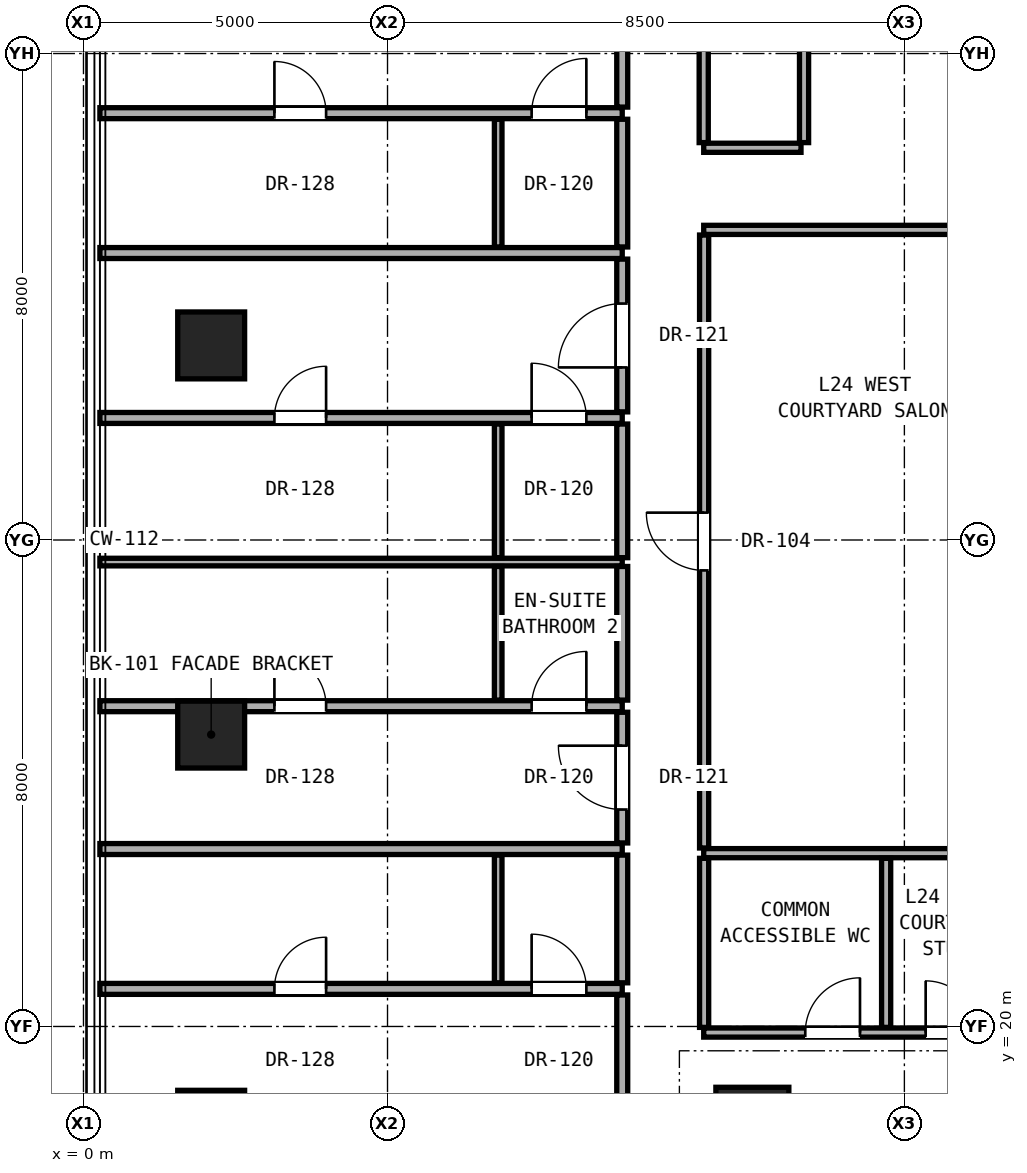
"""IFC4 building model, lengths in metres.
Left out: names, types, materials, properties, quantities, classifications, styles, units other than length and angle.
Written with IfcOpenShell. Run it as: python <this file> out.ifc"""

import sys

from ifc_helpers import new_model, si_unit, direction, frame, frame_2d, origin, origin_2d, place, context, subcontext, project, spatial, rectangle, hollow_rectangle, extrude, element, fill, save


model = new_model("IFC4")
c1 = context("Model", 3, precision=1e-05, world=origin(), true_north=direction((0.0, 1.0)))
c2 = subcontext(c1, "Body", "Model", "MODEL_VIEW")
j1 = project(units=[si_unit("LENGTHUNIT", "METRE"), si_unit("PLANEANGLEUNIT", "RADIAN")], contexts=[c1])
p1 = place(None, origin())
s1 = spatial("IfcSite", under=j1, at=p1, CompositionType="ELEMENT")
p2 = place(p1, origin())
s2 = spatial("IfcBuilding", under=s1, at=p2, CompositionType="ELEMENT")
p3 = place(p2, frame((0.0, 0.0, 88.4)))
s3 = spatial("IfcBuildingStorey", under=s2, at=p3, CompositionType="ELEMENT", Elevation=88.4)
p4 = place(p3, frame((11.0, 18.4, 0.0), z_axis=(0.0, 0.0, 1.0), x_axis=(1.0, 0.0, 0.0)))
e1 = element("IfcColumn", 1, at=p4, inside=s3, PredefinedType="COLUMN", context=c2, shape_type="SweptSolid", body=[
    extrude(rectangle(XDim=1.2, YDim=1.2, at=origin_2d()), origin(), (0.0, 0.0, 1.0), 3.3),
])
for number, where, z_axis, x_axis in (
    (2, (2.1, 18.4, 0.0), (0.0, 0.0, 1.0), (1.0, 0.0, 0.0)),
    (3, (2.1, 24.8, 0.0), (0.0, 0.0, 1.0), (1.0, 0.0, 0.0)),
    (4, (2.1, 31.2, 0.0), (0.0, 0.0, 1.0), (1.0, 0.0, 0.0)),
):
    element("IfcColumn", number, at=place(p3, frame(where, z_axis=z_axis, x_axis=x_axis)), inside=s3, PredefinedType="COLUMN", context=c2, shape_type="SweptSolid", body=[
        extrude(hollow_rectangle(XDim=1.1, YDim=1.1, WallThickness=0.06, at=origin_2d()), origin(), (0.0, 0.0, 1.0), 3.3),
    ])
p5 = place(p3, frame((10.2, 19.9, 0.0), z_axis=(0.0, 0.0, 1.0), x_axis=(1.0, 0.0, 0.0)))
e5 = element("IfcWall", 5, at=p5, inside=s3, PredefinedType="PARTITIONING", context=c2, shape_type="SweptSolid", body=[
    extrude(rectangle(XDim=20.6, YDim=0.15, at=frame_2d((10.3, 0.0))), origin(), (0.0, 0.0, 1.0), 2.124),
])
p6 = place(p5, frame((1.67, 0.0, 0.0)))
e6 = element("IfcOpeningElement", 6, at=p6, cuts=e5, PredefinedType="OPENING", context=c2, shape_type="SweptSolid", body=[
    extrude(rectangle(XDim=0.9, YDim=2.1, at=frame_2d((0.45, 1.05))), frame((0.0, 0.085, 0.0), z_axis=(0.0, -1.0, 0.0), x_axis=(1.0, 0.0, 0.0)), (0.0, 0.0, 1.0), 0.17),
])
p7 = place(p5, frame((3.65, 0.0, 0.0)))
e7 = element("IfcOpeningElement", 7, at=p7, cuts=e5, PredefinedType="OPENING", context=c2, shape_type="SweptSolid", body=[
    extrude(rectangle(XDim=0.85, YDim=2.01, at=frame_2d((0.425, 1.005))), frame((0.0, 0.085, 0.0), z_axis=(0.0, -1.0, 0.0), x_axis=(1.0, 0.0, 0.0)), (0.0, 0.0, 1.0), 0.17),
])
p8 = place(p5, frame((7.197, 0.0, 0.0)))
e8 = element("IfcOpeningElement", 8, at=p8, cuts=e5, PredefinedType="OPENING", context=c2, shape_type="SweptSolid", body=[
    extrude(rectangle(XDim=0.85, YDim=2.01, at=frame_2d((0.425, 1.005))), frame((0.0, 0.085, 0.0), z_axis=(0.0, -1.0, 0.0), x_axis=(1.0, 0.0, 0.0)), (0.0, 0.0, 1.0), 0.17),
])
p9 = place(p3, frame((0.27, 20.618, 0.0), z_axis=(0.0, 0.0, 1.0), x_axis=(1.0, 0.0, 0.0)))
e9 = element("IfcWall", 9, at=p9, inside=s3, PredefinedType="PARTITIONING", context=c2, shape_type="SweptSolid", body=[
    extrude(rectangle(XDim=8.59, YDim=0.18, at=frame_2d((4.295, 0.0))), origin(), (0.0, 0.0, 1.0), 2.145),
])
p10 = place(p9, frame((2.87, 0.0, 0.0)))
e10 = element("IfcOpeningElement", 10, at=p10, cuts=e9, PredefinedType="OPENING", context=c2, shape_type="SweptSolid", body=[
    extrude(rectangle(XDim=0.85, YDim=2.01, at=frame_2d((0.425, 1.005))), frame((0.0, 0.1, 0.0), z_axis=(0.0, -1.0, 0.0), x_axis=(1.0, 0.0, 0.0)), (0.0, 0.0, 1.0), 0.2),
])
p11 = place(p9, frame((7.1, 0.0, 0.0)))
e11 = element("IfcOpeningElement", 11, at=p11, cuts=e9, PredefinedType="OPENING", context=c2, shape_type="SweptSolid", body=[
    extrude(rectangle(XDim=0.9, YDim=2.1, at=frame_2d((0.45, 1.05))), frame((0.0, 0.1, 0.0), z_axis=(0.0, -1.0, 0.0), x_axis=(1.0, 0.0, 0.0)), (0.0, 0.0, 1.0), 0.2),
])
p12 = place(p3, frame((0.27, 22.918, 0.0), z_axis=(0.0, 0.0, 1.0), x_axis=(1.0, 0.0, 0.0)))
e12 = element("IfcWall", 12, at=p12, inside=s3, PredefinedType="PARTITIONING", context=c2, shape_type="SweptSolid", body=[
    extrude(rectangle(XDim=8.59, YDim=0.18, at=frame_2d((4.295, 0.0))), origin(), (0.0, 0.0, 1.0), 2.145),
])
p13 = place(p3, frame((10.2, 22.85, 0.0), z_axis=(0.0, 0.0, 1.0), x_axis=(1.0, 0.0, 0.0)))
e13 = element("IfcWall", 13, at=p13, inside=s3, PredefinedType="PARTITIONING", context=c2, shape_type="SweptSolid", body=[
    extrude(rectangle(XDim=5.15, YDim=0.15, at=frame_2d((2.575, 0.0))), origin(), (0.0, 0.0, 1.0), 2.124),
])
p14 = place(p3, frame((0.27, 25.267, 0.0), z_axis=(0.0, 0.0, 1.0), x_axis=(1.0, 0.0, 0.0)))
e14 = element("IfcWall", 14, at=p14, inside=s3, PredefinedType="PARTITIONING", context=c2, shape_type="SweptSolid", body=[
    extrude(rectangle(XDim=8.59, YDim=0.18, at=frame_2d((4.295, 0.0))), origin(), (0.0, 0.0, 1.0), 2.145),
])
p15 = place(p14, frame((2.87, 0.0, 0.0)))
e15 = element("IfcOpeningElement", 15, at=p15, cuts=e14, PredefinedType="OPENING", context=c2, shape_type="SweptSolid", body=[
    extrude(rectangle(XDim=0.85, YDim=2.01, at=frame_2d((0.425, 1.005))), frame((0.0, 0.1, 0.0), z_axis=(0.0, -1.0, 0.0), x_axis=(1.0, 0.0, 0.0)), (0.0, 0.0, 1.0), 0.2),
])
p16 = place(p14, frame((7.1, 0.0, 0.0)))
e16 = element("IfcOpeningElement", 16, at=p16, cuts=e14, PredefinedType="OPENING", context=c2, shape_type="SweptSolid", body=[
    extrude(rectangle(XDim=0.9, YDim=2.1, at=frame_2d((0.45, 1.05))), frame((0.0, 0.1, 0.0), z_axis=(0.0, -1.0, 0.0), x_axis=(1.0, 0.0, 0.0)), (0.0, 0.0, 1.0), 0.2),
])
p17 = place(p3, frame((0.27, 27.637, 0.0), z_axis=(0.0, 0.0, 1.0), x_axis=(1.0, 0.0, 0.0)))
e17 = element("IfcWall", 17, at=p17, inside=s3, PredefinedType="PARTITIONING", context=c2, shape_type="SweptSolid", body=[
    extrude(rectangle(XDim=8.59, YDim=0.125, at=frame_2d((4.295, 0.0))), origin(), (0.0, 0.0, 1.0), 2.145),
])
p18 = place(p3, frame((0.27, 30.007, 0.0), z_axis=(0.0, 0.0, 1.0), x_axis=(1.0, 0.0, 0.0)))
e18 = element("IfcWall", 18, at=p18, inside=s3, PredefinedType="PARTITIONING", context=c2, shape_type="SweptSolid", body=[
    extrude(rectangle(XDim=8.59, YDim=0.18, at=frame_2d((4.295, 0.0))), origin(), (0.0, 0.0, 1.0), 2.145),
])
p19 = place(p18, frame((2.87, 0.0, 0.0)))
e19 = element("IfcOpeningElement", 19, at=p19, cuts=e18, PredefinedType="OPENING", context=c2, shape_type="SweptSolid", body=[
    extrude(rectangle(XDim=0.85, YDim=2.01, at=frame_2d((0.425, 1.005))), frame((0.0, 0.1, 0.0), z_axis=(0.0, -1.0, 0.0), x_axis=(1.0, 0.0, 0.0)), (0.0, 0.0, 1.0), 0.2),
])
p20 = place(p18, frame((7.1, 0.0, 0.0)))
e20 = element("IfcOpeningElement", 20, at=p20, cuts=e18, PredefinedType="OPENING", context=c2, shape_type="SweptSolid", body=[
    extrude(rectangle(XDim=0.9, YDim=2.1, at=frame_2d((0.45, 1.05))), frame((0.0, 0.1, 0.0), z_axis=(0.0, -1.0, 0.0), x_axis=(1.0, 0.0, 0.0)), (0.0, 0.0, 1.0), 0.2),
])
p21 = place(p3, frame((0.27, 32.719, 0.0), z_axis=(0.0, 0.0, 1.0), x_axis=(1.0, 0.0, 0.0)))
e21 = element("IfcWall", 21, at=p21, inside=s3, PredefinedType="PARTITIONING", context=c2, shape_type="SweptSolid", body=[
    extrude(rectangle(XDim=8.59, YDim=0.18, at=frame_2d((4.295, 0.0))), origin(), (0.0, 0.0, 1.0), 2.145),
])
p22 = place(p3, frame((10.2, 33.1, 0.0), z_axis=(0.0, 0.0, 1.0), x_axis=(1.0, 0.0, 0.0)))
e22 = element("IfcWall", 22, at=p22, inside=s3, PredefinedType="PARTITIONING", context=c2, shape_type="SweptSolid", body=[
    extrude(rectangle(XDim=20.6, YDim=0.15, at=frame_2d((10.3, 0.0))), origin(), (0.0, 0.0, 1.0), 2.124),
])
p23 = place(p22, frame((12.373, 0.0, 0.0)))
e23 = element("IfcOpeningElement", 23, at=p23, cuts=e22, PredefinedType="OPENING", context=c2, shape_type="SweptSolid", body=[
    extrude(rectangle(XDim=0.85, YDim=2.01, at=frame_2d((0.425, 1.005))), frame((0.0, 0.085, 0.0), z_axis=(0.0, -1.0, 0.0), x_axis=(1.0, 0.0, 0.0)), (0.0, 0.0, 1.0), 0.17),
])
p24 = place(p22, frame((17.606, 0.0, 0.0)))
e24 = element("IfcOpeningElement", 24, at=p24, cuts=e22, PredefinedType="OPENING", context=c2, shape_type="SweptSolid", body=[
    extrude(rectangle(XDim=0.85, YDim=2.01, at=frame_2d((0.425, 1.005))), frame((0.0, 0.085, 0.0), z_axis=(0.0, -1.0, 0.0), x_axis=(1.0, 0.0, 0.0)), (0.0, 0.0, 1.0), 0.17),
])
p25 = place(p3, frame((10.2, 34.45, 0.0), z_axis=(0.0, 0.0, 1.0), x_axis=(1.0, 0.0, 0.0)))
e25 = element("IfcWall", 25, at=p25, inside=s3, PredefinedType="PARTITIONING", context=c2, shape_type="SweptSolid", body=[
    extrude(rectangle(XDim=1.6, YDim=0.15, at=frame_2d((0.8, 0.0))), origin(), (0.0, 0.0, 1.0), 2.124),
])
p26 = place(p3, frame((0.27, 35.019, 0.0), z_axis=(0.0, 0.0, 1.0), x_axis=(1.0, 0.0, 0.0)))
e26 = element("IfcWall", 26, at=p26, inside=s3, PredefinedType="PARTITIONING", context=c2, shape_type="SweptSolid", body=[
    extrude(rectangle(XDim=8.59, YDim=0.18, at=frame_2d((4.295, 0.0))), origin(), (0.0, 0.0, 1.0), 2.145),
])
p27 = place(p26, frame((2.87, 0.0, 0.0)))
e27 = element("IfcOpeningElement", 27, at=p27, cuts=e26, PredefinedType="OPENING", context=c2, shape_type="SweptSolid", body=[
    extrude(rectangle(XDim=0.85, YDim=2.01, at=frame_2d((0.425, 1.005))), frame((0.0, 0.1, 0.0), z_axis=(0.0, -1.0, 0.0), x_axis=(1.0, 0.0, 0.0)), (0.0, 0.0, 1.0), 0.2),
])
p28 = place(p26, frame((7.1, 0.0, 0.0)))
e28 = element("IfcOpeningElement", 28, at=p28, cuts=e26, PredefinedType="OPENING", context=c2, shape_type="SweptSolid", body=[
    extrude(rectangle(XDim=0.9, YDim=2.1, at=frame_2d((0.45, 1.05))), frame((0.0, 0.1, 0.0), z_axis=(0.0, -1.0, 0.0), x_axis=(1.0, 0.0, 0.0)), (0.0, 0.0, 1.0), 0.2),
])
p29 = place(p3, frame((6.82, 20.718, 0.0), z_axis=(0.0, 0.0, 1.0), x_axis=(0.0, 1.0, 0.0)))
e29 = element("IfcWall", 29, at=p29, inside=s3, PredefinedType="PARTITIONING", context=c2, shape_type="SweptSolid", body=[
    extrude(rectangle(XDim=2.1, YDim=0.125, at=frame_2d((1.05, 0.0))), origin(), (0.0, 0.0, 1.0), 3.08),
])
for number, where, z_axis, x_axis in (
    (30, (6.82, 25.367, 0.0), (0.0, 0.0, 1.0), (0.0, 1.0, 0.0)),
    (31, (6.82, 27.709, 0.0), (0.0, 0.0, 1.0), (0.0, 1.0, 0.0)),
):
    element("IfcWall", number, at=place(p3, frame(where, z_axis=z_axis, x_axis=x_axis)), inside=s3, PredefinedType="PARTITIONING", context=c2, shape_type="SweptSolid", body=[
        extrude(rectangle(XDim=2.198, YDim=0.125, at=frame_2d((1.099, 0.0))), origin(), (0.0, 0.0, 1.0), 3.08),
    ])
p30 = place(p3, frame((6.82, 32.819, 0.0), z_axis=(0.0, 0.0, 1.0), x_axis=(0.0, 1.0, 0.0)))
e32 = element("IfcWall", 32, at=p30, inside=s3, PredefinedType="PARTITIONING", context=c2, shape_type="SweptSolid", body=[
    extrude(rectangle(XDim=2.1, YDim=0.125, at=frame_2d((1.05, 0.0))), origin(), (0.0, 0.0, 1.0), 3.08),
])
p31 = place(p3, frame((8.86, 14.875, 0.0), z_axis=(0.0, 0.0, 1.0), x_axis=(0.0, 1.0, 0.0)))
e33 = element("IfcWall", 33, at=p31, inside=s3, PredefinedType="PARTITIONING", context=c2, shape_type="SweptSolid", body=[
    extrude(rectangle(XDim=5.643, YDim=0.18, at=frame_2d((2.822, 0.0))), origin(), (0.0, 0.0, 1.0), 2.456),
])
p32 = place(p31, frame((2.296, 0.0, 0.0)))
e34 = element("IfcOpeningElement", 34, at=p32, cuts=e33, PredefinedType="OPENING", context=c2, shape_type="SweptSolid", body=[
    extrude(rectangle(XDim=1.05, YDim=2.2, at=frame_2d((0.525, 1.1))), frame((0.0, 0.1, 0.0), z_axis=(0.0, -1.0, 0.0), x_axis=(1.0, 0.0, 0.0)), (0.0, 0.0, 1.0), 0.2),
])
p33 = place(p3, frame((8.86, 20.718, 0.0), z_axis=(0.0, 0.0, 1.0), x_axis=(0.0, 1.0, 0.0)))
e35 = element("IfcWall", 35, at=p33, inside=s3, PredefinedType="PARTITIONING", context=c2, shape_type="SweptSolid", body=[
    extrude(rectangle(XDim=2.1, YDim=0.18, at=frame_2d((1.05, 0.0))), origin(), (0.0, 0.0, 1.0), 3.08),
])
p34 = place(p3, frame((8.86, 23.018, 0.0), z_axis=(0.0, 0.0, 1.0), x_axis=(0.0, 1.0, 0.0)))
e36 = element("IfcWall", 36, at=p34, inside=s3, PredefinedType="PARTITIONING", context=c2, shape_type="SweptSolid", body=[
    extrude(rectangle(XDim=2.149, YDim=0.18, at=frame_2d((1.074, 0.0))), origin(), (0.0, 0.0, 1.0), 2.299),
])
p35 = place(p34, frame((0.55, 0.0, 0.0)))
e37 = element("IfcOpeningElement", 37, at=p35, cuts=e36, PredefinedType="OPENING", context=c2, shape_type="SweptSolid", body=[
    extrude(rectangle(XDim=1.05, YDim=2.2, at=frame_2d((0.525, 1.1))), frame((0.0, 0.1, 0.0), z_axis=(0.0, -1.0, 0.0), x_axis=(1.0, 0.0, 0.0)), (0.0, 0.0, 1.0), 0.2),
])
for number, where, z_axis, x_axis in (
    (38, (8.86, 25.367, 0.0), (0.0, 0.0, 1.0), (0.0, 1.0, 0.0)),
    (39, (8.86, 27.709, 0.0), (0.0, 0.0, 1.0), (0.0, 1.0, 0.0)),
):
    element("IfcWall", number, at=place(p3, frame(where, z_axis=z_axis, x_axis=x_axis)), inside=s3, PredefinedType="PARTITIONING", context=c2, shape_type="SweptSolid", body=[
        extrude(rectangle(XDim=2.198, YDim=0.18, at=frame_2d((1.099, 0.0))), origin(), (0.0, 0.0, 1.0), 3.08),
    ])
p36 = place(p3, frame((8.86, 30.107, 0.0), z_axis=(0.0, 0.0, 1.0), x_axis=(0.0, 1.0, 0.0)))
e40 = element("IfcWall", 40, at=p36, inside=s3, PredefinedType="PARTITIONING", context=c2, shape_type="SweptSolid", body=[
    extrude(rectangle(XDim=2.512, YDim=0.18, at=frame_2d((1.256, 0.0))), origin(), (0.0, 0.0, 1.0), 2.299),
])
p37 = place(p36, frame((0.731, 0.0, 0.0)))
e41 = element("IfcOpeningElement", 41, at=p37, cuts=e40, PredefinedType="OPENING", context=c2, shape_type="SweptSolid", body=[
    extrude(rectangle(XDim=1.05, YDim=2.2, at=frame_2d((0.525, 1.1))), frame((0.0, 0.1, 0.0), z_axis=(0.0, -1.0, 0.0), x_axis=(1.0, 0.0, 0.0)), (0.0, 0.0, 1.0), 0.2),
])
p38 = place(p3, frame((8.86, 32.819, 0.0), z_axis=(0.0, 0.0, 1.0), x_axis=(0.0, 1.0, 0.0)))
e42 = element("IfcWall", 42, at=p38, inside=s3, PredefinedType="PARTITIONING", context=c2, shape_type="SweptSolid", body=[
    extrude(rectangle(XDim=2.1, YDim=0.18, at=frame_2d((1.05, 0.0))), origin(), (0.0, 0.0, 1.0), 3.08),
])
p39 = place(p3, frame((8.86, 35.119, 0.0), z_axis=(0.0, 0.0, 1.0), x_axis=(0.0, 1.0, 0.0)))
e43 = element("IfcWall", 43, at=p39, inside=s3, PredefinedType="PARTITIONING", context=c2, shape_type="SweptSolid", body=[
    extrude(rectangle(XDim=6.006, YDim=0.18, at=frame_2d((3.003, 0.0))), origin(), (0.0, 0.0, 1.0), 2.456),
])
p40 = place(p39, frame((2.478, 0.0, 0.0)))
e44 = element("IfcOpeningElement", 44, at=p40, cuts=e43, PredefinedType="OPENING", context=c2, shape_type="SweptSolid", body=[
    extrude(rectangle(XDim=1.05, YDim=2.2, at=frame_2d((0.525, 1.1))), frame((0.0, 0.1, 0.0), z_axis=(0.0, -1.0, 0.0), x_axis=(1.0, 0.0, 0.0)), (0.0, 0.0, 1.0), 0.2),
])
p41 = place(p3, frame((10.207, 19.985, 0.0), z_axis=(0.0, 0.0, 1.0), x_axis=(0.0, 1.0, 0.0)))
e45 = element("IfcWall", 45, at=p41, inside=s3, PredefinedType="PARTITIONING", context=c2, shape_type="SweptSolid", body=[
    extrude(rectangle(XDim=2.78, YDim=0.15, at=frame_2d((1.39, 0.0))), origin(), (0.0, 0.0, 1.0), 3.08),
])
p42 = place(p3, frame((10.207, 22.935, 0.0), z_axis=(0.0, 0.0, 1.0), x_axis=(0.0, 1.0, 0.0)))
e46 = element("IfcWall", 46, at=p42, inside=s3, PredefinedType="PARTITIONING", context=c2, shape_type="SweptSolid", body=[
    extrude(rectangle(XDim=10.08, YDim=0.15, at=frame_2d((5.04, 0.0))), origin(), (0.0, 0.0, 1.0), 2.299),
])
p43 = place(p42, frame((4.565, 0.0, 0.0)))
e47 = element("IfcOpeningElement", 47, at=p43, cuts=e46, PredefinedType="OPENING", context=c2, shape_type="SweptSolid", body=[
    extrude(rectangle(XDim=0.95, YDim=2.15, at=frame_2d((0.475, 1.075))), frame((0.0, 0.085, 0.0), z_axis=(0.0, -1.0, 0.0), x_axis=(1.0, 0.0, 0.0)), (0.0, 0.0, 1.0), 0.17),
])
p44 = place(p3, frame((10.2, 34.535, 0.0), z_axis=(0.0, 0.0, 1.0), x_axis=(0.0, 1.0, 0.0)))
e48 = element("IfcWall", 48, at=p44, inside=s3, PredefinedType="PARTITIONING", context=c2, shape_type="SweptSolid", body=[
    extrude(rectangle(XDim=9.13, YDim=0.15, at=frame_2d((4.565, 0.0))), origin(), (0.0, 0.0, 1.0), 2.456),
])
p45 = place(p3, frame((11.85, 34.535, 0.0), z_axis=(0.0, 0.0, 1.0), x_axis=(0.0, 1.0, 0.0)))
e49 = element("IfcWall", 49, at=p45, inside=s3, PredefinedType="PARTITIONING", context=c2, shape_type="SweptSolid", body=[
    extrude(rectangle(XDim=2.745, YDim=0.15, at=frame_2d((1.373, 0.0))), origin(), (0.0, 0.0, 1.0), 3.08),
])
p46 = place(p3, frame((13.2, 19.985, 0.0), z_axis=(0.0, 0.0, 1.0), x_axis=(0.0, 1.0, 0.0)))
e50 = element("IfcWall", 50, at=p46, inside=s3, PredefinedType="PARTITIONING", context=c2, shape_type="SweptSolid", body=[
    extrude(rectangle(XDim=2.78, YDim=0.15, at=frame_2d((1.39, 0.0))), origin(), (0.0, 0.0, 1.0), 3.08),
])
p47 = place(p6, origin())
e51 = element("IfcDoor", 51, at=p47, inside=s3, OperationType="SINGLE_SWING_RIGHT", PredefinedType="DOOR", context=c2, shape_type="SweptSolid", body=[
    extrude(rectangle(XDim=0.9, YDim=2.1, at=frame_2d((0.45, 1.05))), frame((0.0, 0.025, 0.0), z_axis=(0.0, -1.0, 0.0), x_axis=(1.0, 0.0, 0.0)), (0.0, 0.0, 1.0), 0.05),
])
fill(e6, e51)
p48 = place(p10, origin())
e52 = element("IfcDoor", 52, at=p48, inside=s3, OperationType="SINGLE_SWING_RIGHT", PredefinedType="DOOR", context=c2, shape_type="SweptSolid", body=[
    extrude(rectangle(XDim=0.85, YDim=2.01, at=frame_2d((0.425, 1.005))), frame((0.0, 0.025, 0.0), z_axis=(0.0, -1.0, 0.0), x_axis=(1.0, 0.0, 0.0)), (0.0, 0.0, 1.0), 0.05),
])
fill(e10, e52)
p49 = place(p11, origin())
e53 = element("IfcDoor", 53, at=p49, inside=s3, OperationType="SINGLE_SWING_LEFT", PredefinedType="DOOR", context=c2, shape_type="SweptSolid", body=[
    extrude(rectangle(XDim=0.9, YDim=2.1, at=frame_2d((0.45, 1.05))), frame((0.0, 0.025, 0.0), z_axis=(0.0, -1.0, 0.0), x_axis=(1.0, 0.0, 0.0)), (0.0, 0.0, 1.0), 0.05),
])
fill(e11, e53)
p50 = place(p35, origin())
e54 = element("IfcDoor", 54, at=p50, inside=s3, OperationType="SINGLE_SWING_RIGHT", PredefinedType="DOOR", context=c2, shape_type="SweptSolid", body=[
    extrude(rectangle(XDim=1.05, YDim=2.2, at=frame_2d((0.525, 1.1))), frame((0.0, 0.025, 0.0), z_axis=(0.0, -1.0, 0.0), x_axis=(1.0, 0.0, 0.0)), (0.0, 0.0, 1.0), 0.05),
])
fill(e37, e54)
p51 = place(p15, origin())
e55 = element("IfcDoor", 55, at=p51, inside=s3, OperationType="SINGLE_SWING_LEFT", PredefinedType="DOOR", context=c2, shape_type="SweptSolid", body=[
    extrude(rectangle(XDim=0.85, YDim=2.01, at=frame_2d((0.425, 1.005))), frame((0.0, 0.025, 0.0), z_axis=(0.0, -1.0, 0.0), x_axis=(1.0, 0.0, 0.0)), (0.0, 0.0, 1.0), 0.05),
])
fill(e15, e55)
p52 = place(p16, origin())
e56 = element("IfcDoor", 56, at=p52, inside=s3, OperationType="SINGLE_SWING_RIGHT", PredefinedType="DOOR", context=c2, shape_type="SweptSolid", body=[
    extrude(rectangle(XDim=0.9, YDim=2.1, at=frame_2d((0.45, 1.05))), frame((0.0, 0.025, 0.0), z_axis=(0.0, -1.0, 0.0), x_axis=(1.0, 0.0, 0.0)), (0.0, 0.0, 1.0), 0.05),
])
fill(e16, e56)
p53 = place(p37, origin())
e57 = element("IfcDoor", 57, at=p53, inside=s3, OperationType="SINGLE_SWING_LEFT", PredefinedType="DOOR", context=c2, shape_type="SweptSolid", body=[
    extrude(rectangle(XDim=1.05, YDim=2.2, at=frame_2d((0.525, 1.1))), frame((0.0, 0.025, 0.0), z_axis=(0.0, -1.0, 0.0), x_axis=(1.0, 0.0, 0.0)), (0.0, 0.0, 1.0), 0.05),
])
fill(e41, e57)
p54 = place(p19, origin())
e58 = element("IfcDoor", 58, at=p54, inside=s3, OperationType="SINGLE_SWING_RIGHT", PredefinedType="DOOR", context=c2, shape_type="SweptSolid", body=[
    extrude(rectangle(XDim=0.85, YDim=2.01, at=frame_2d((0.425, 1.005))), frame((0.0, 0.025, 0.0), z_axis=(0.0, -1.0, 0.0), x_axis=(1.0, 0.0, 0.0)), (0.0, 0.0, 1.0), 0.05),
])
fill(e19, e58)
p55 = place(p20, origin())
e59 = element("IfcDoor", 59, at=p55, inside=s3, OperationType="SINGLE_SWING_LEFT", PredefinedType="DOOR", context=c2, shape_type="SweptSolid", body=[
    extrude(rectangle(XDim=0.9, YDim=2.1, at=frame_2d((0.45, 1.05))), frame((0.0, 0.025, 0.0), z_axis=(0.0, -1.0, 0.0), x_axis=(1.0, 0.0, 0.0)), (0.0, 0.0, 1.0), 0.05),
])
fill(e20, e59)
p56 = place(p27, origin())
e60 = element("IfcDoor", 60, at=p56, inside=s3, OperationType="SINGLE_SWING_LEFT", PredefinedType="DOOR", context=c2, shape_type="SweptSolid", body=[
    extrude(rectangle(XDim=0.85, YDim=2.01, at=frame_2d((0.425, 1.005))), frame((0.0, 0.025, 0.0), z_axis=(0.0, -1.0, 0.0), x_axis=(1.0, 0.0, 0.0)), (0.0, 0.0, 1.0), 0.05),
])
fill(e27, e60)
p57 = place(p28, origin())
e61 = element("IfcDoor", 61, at=p57, inside=s3, OperationType="SINGLE_SWING_RIGHT", PredefinedType="DOOR", context=c2, shape_type="SweptSolid", body=[
    extrude(rectangle(XDim=0.9, YDim=2.1, at=frame_2d((0.45, 1.05))), frame((0.0, 0.025, 0.0), z_axis=(0.0, -1.0, 0.0), x_axis=(1.0, 0.0, 0.0)), (0.0, 0.0, 1.0), 0.05),
])
fill(e28, e61)
p58 = place(p7, origin())
e62 = element("IfcDoor", 62, at=p58, inside=s3, OperationType="SINGLE_SWING_LEFT", PredefinedType="DOOR", context=c2, shape_type="SweptSolid", body=[
    extrude(rectangle(XDim=0.85, YDim=2.01, at=frame_2d((0.425, 1.005))), frame((0.0, 0.025, 0.0), z_axis=(0.0, -1.0, 0.0), x_axis=(1.0, 0.0, 0.0)), (0.0, 0.0, 1.0), 0.05),
])
fill(e7, e62)
p59 = place(p43, origin())
e63 = element("IfcDoor", 63, at=p59, inside=s3, OperationType="SINGLE_SWING_RIGHT", PredefinedType="DOOR", context=c2, shape_type="SweptSolid", body=[
    extrude(rectangle(XDim=0.95, YDim=2.15, at=frame_2d((0.475, 1.075))), frame((0.0, 0.025, 0.0), z_axis=(0.0, -1.0, 0.0), x_axis=(1.0, 0.0, 0.0)), (0.0, 0.0, 1.0), 0.05),
])
fill(e47, e63)
save(model, sys.argv[1])
